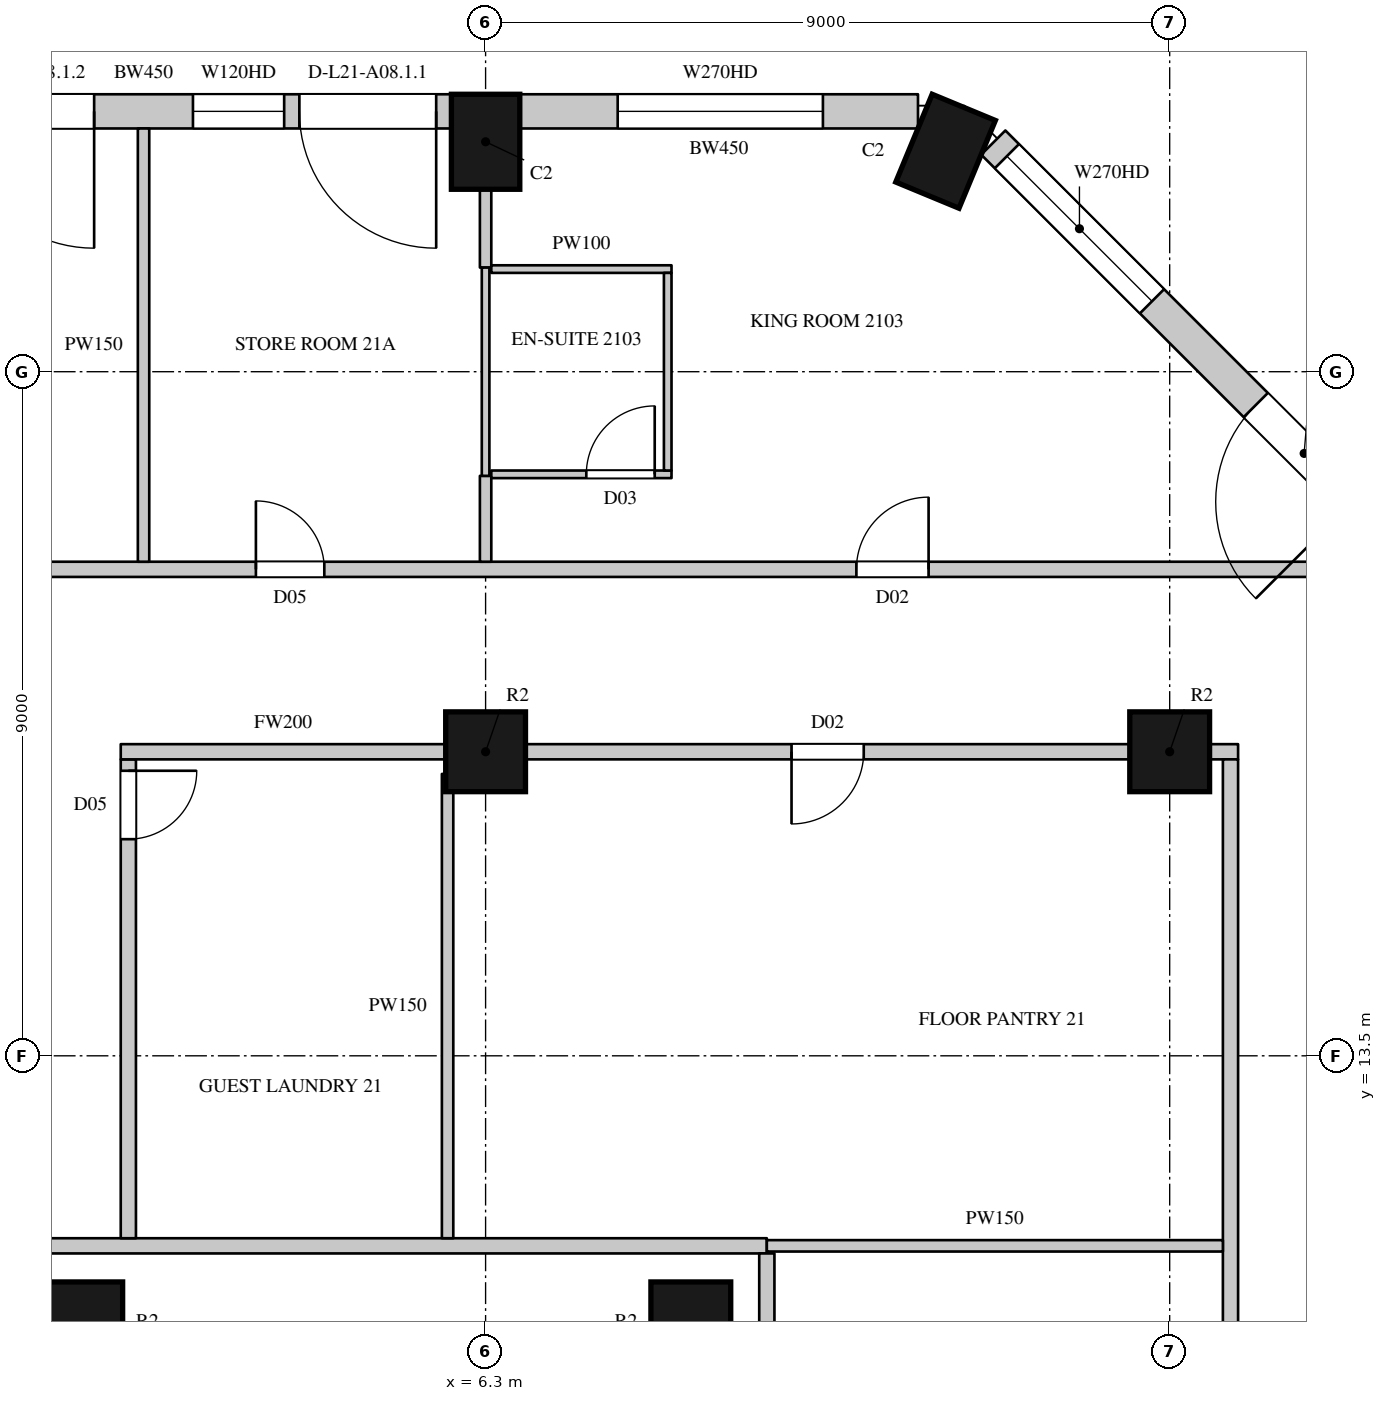
"""IFC4 building model, lengths in metres.
Left out: names, types, materials, properties, quantities, classifications, styles, units other than length and angle.
Written with IfcOpenShell. Run it as: python <this file> out.ifc"""

import sys

from ifc_helpers import new_model, si_unit, direction, frame, frame_2d, origin, origin_2d, place, context, subcontext, project, spatial, rectangle, circle, extrude, element, fill, save


model = new_model("IFC4")
c1 = context("Model", 3, precision=1e-05, world=origin(), true_north=direction((0.0, 1.0)))
c2 = subcontext(c1, "Body", "Model", "MODEL_VIEW")
j1 = project(units=[si_unit("LENGTHUNIT", "METRE"), si_unit("PLANEANGLEUNIT", "RADIAN")], contexts=[c1])
p1 = place(None, origin())
s1 = spatial("IfcSite", under=j1, at=p1, CompositionType="ELEMENT")
p2 = place(p1, origin())
s2 = spatial("IfcBuilding", under=s1, at=p2, CompositionType="ELEMENT")
p3 = place(p2, frame((0.0, 0.0, 105.9)))
s3 = spatial("IfcBuildingStorey", under=s2, at=p3, CompositionType="ELEMENT", Elevation=105.9)
for number, where, z_axis, x_axis in (
    (1, (12.352, 25.4, 0.0), (0.0, 0.0, 1.0), (-0.924, 0.383, 0.0)),
    (2, (6.3, 25.525, 0.0), (0.0, 0.0, 1.0), (-1.0, 0.0, 0.0)),
):
    element("IfcColumn", number, at=place(p3, frame(where, z_axis=z_axis, x_axis=x_axis)), inside=s3, PredefinedType="COLUMN", context=c2, shape_type="SweptSolid", body=[
        extrude(rectangle(XDim=0.9, YDim=1.25, at=origin_2d()), origin(), (0.0, 0.0, 1.0), 3.6),
    ])
for number, where, z_axis, x_axis in (
    (3, (6.3, 17.5, 0.0), (0.0, 0.0, 1.0), (1.0, 0.0, 0.0)),
    (4, (15.3, 17.5, 0.0), (0.0, 0.0, 1.0), (1.0, 0.0, 0.0)),
    (5, (1.0, 10.0, 0.0), (0.0, 0.0, 1.0), (1.0, 0.0, 0.0)),
    (6, (9.0, 10.0, 0.0), (0.0, 0.0, 1.0), (1.0, 0.0, 0.0)),
):
    element("IfcColumn", number, at=place(p3, frame(where, z_axis=z_axis, x_axis=x_axis)), inside=s3, PredefinedType="COLUMN", context=c2, shape_type="SweptSolid", body=[
        extrude(circle(Radius=0.525, at=origin_2d()), origin(), (0.0, 0.0, 1.0), 3.6),
    ])
p4 = place(p3, frame((18.229, 20.265, 0.0), z_axis=(0.0, 0.0, 1.0), x_axis=(-0.707106781187, 0.707106781187, 0.0)))
e7 = element("IfcWall", 7, at=p4, inside=s3, PredefinedType="SOLIDWALL", context=c2, shape_type="SweptSolid", body=[
    extrude(rectangle(XDim=7.424, YDim=0.45, at=frame_2d((3.712, 0.0))), origin(), (0.0, 0.0, 1.0), 3.3),
])
p5 = place(p4, frame((0.74, 0.0, 0.0)))
e8 = element("IfcOpeningElement", 8, at=p5, cuts=e7, PredefinedType="OPENING", context=c2, shape_type="SweptSolid", body=[
    extrude(rectangle(XDim=1.8, YDim=2.4, at=frame_2d((0.9, 1.2))), frame((0.0, 0.235, 0.0), z_axis=(0.0, -1.0, 0.0), x_axis=(1.0, 0.0, 0.0)), (0.0, 0.0, 1.0), 0.47),
])
p6 = place(p4, frame((4.471, 0.0, 1.05)))
e9 = element("IfcOpeningElement", 9, at=p6, cuts=e7, PredefinedType="OPENING", context=c2, shape_type="SweptSolid", body=[
    extrude(rectangle(XDim=2.7, YDim=2.0, at=frame_2d((1.35, 1.0))), frame((0.0, 0.235, 0.0), z_axis=(0.0, -1.0, 0.0), x_axis=(1.0, 0.0, 0.0)), (0.0, 0.0, 1.0), 0.47),
])
p7 = place(p3, frame((11.989, 25.925, 0.0), z_axis=(0.0, 0.0, 1.0), x_axis=(-1.0, 0.0, 0.0)))
e10 = element("IfcWall", 10, at=p7, inside=s3, PredefinedType="SOLIDWALL", context=c2, shape_type="SweptSolid", body=[
    extrude(rectangle(XDim=5.239, YDim=0.45, at=frame_2d((2.619, 0.0))), origin(), (0.0, 0.0, 1.0), 3.3),
])
p8 = place(p7, frame((1.251, 0.0, 1.05)))
e11 = element("IfcOpeningElement", 11, at=p8, cuts=e10, PredefinedType="OPENING", context=c2, shape_type="SweptSolid", body=[
    extrude(rectangle(XDim=2.7, YDim=2.0, at=frame_2d((1.35, 1.0))), frame((0.0, 0.235, 0.0), z_axis=(0.0, -1.0, 0.0), x_axis=(1.0, 0.0, 0.0)), (0.0, 0.0, 1.0), 0.47),
])
p9 = place(p3, frame((5.85, 25.925, 0.0), z_axis=(0.0, 0.0, 1.0), x_axis=(-1.0, 0.0, 0.0)))
e12 = element("IfcWall", 12, at=p9, inside=s3, PredefinedType="SOLIDWALL", context=c2, shape_type="SweptSolid", body=[
    extrude(rectangle(XDim=8.1, YDim=0.45, at=frame_2d((4.05, 0.0))), origin(), (0.0, 0.0, 1.0), 3.3),
])
p10 = place(p9, frame((0.2, 0.0, 0.0)))
e13 = element("IfcOpeningElement", 13, at=p10, cuts=e12, PredefinedType="OPENING", context=c2, shape_type="SweptSolid", body=[
    extrude(rectangle(XDim=1.8, YDim=2.4, at=frame_2d((0.9, 1.2))), frame((0.0, 0.235, 0.0), z_axis=(0.0, -1.0, 0.0), x_axis=(1.0, 0.0, 0.0)), (0.0, 0.0, 1.0), 0.47),
])
p11 = place(p9, frame((2.2, 0.0, 1.05)))
e14 = element("IfcOpeningElement", 14, at=p11, cuts=e12, PredefinedType="OPENING", context=c2, shape_type="SweptSolid", body=[
    extrude(rectangle(XDim=1.2, YDim=2.0, at=frame_2d((0.6, 1.0))), frame((0.0, 0.235, 0.0), z_axis=(0.0, -1.0, 0.0), x_axis=(1.0, 0.0, 0.0)), (0.0, 0.0, 1.0), 0.47),
])
p12 = place(p9, frame((4.7, 0.0, 0.0)))
e15 = element("IfcOpeningElement", 15, at=p12, cuts=e12, PredefinedType="OPENING", context=c2, shape_type="SweptSolid", body=[
    extrude(rectangle(XDim=1.8, YDim=2.4, at=frame_2d((0.9, 1.2))), frame((0.0, 0.235, 0.0), z_axis=(0.0, -1.0, 0.0), x_axis=(1.0, 0.0, 0.0)), (0.0, 0.0, 1.0), 0.47),
])
p13 = place(p9, frame((6.7, 0.0, 1.05)))
e16 = element("IfcOpeningElement", 16, at=p13, cuts=e12, PredefinedType="OPENING", context=c2, shape_type="SweptSolid", body=[
    extrude(rectangle(XDim=1.2, YDim=2.0, at=frame_2d((0.6, 1.0))), frame((0.0, 0.235, 0.0), z_axis=(0.0, -1.0, 0.0), x_axis=(1.0, 0.0, 0.0)), (0.0, 0.0, 1.0), 0.47),
])
p14 = place(p3, frame((16.486, 23.529, 0.0), z_axis=(0.0, 0.0, 1.0), x_axis=(-0.707022305137, 0.707191247145, 0.0)))
e17 = element("IfcWall", 17, at=p14, inside=s3, PredefinedType="SOLIDWALL", context=c2, shape_type="SweptSolid", body=[
    extrude(rectangle(XDim=1.445, YDim=0.45, at=frame_2d((0.723, 0.0))), origin(), (0.0, 0.0, 1.0), 0.6),
])
p15 = place(p3, frame((-23.822, 19.9, 0.0), z_axis=(0.0, 0.0, 1.0), x_axis=(1.0, 0.0, 0.0)))
e18 = element("IfcWall", 18, at=p15, inside=s3, PredefinedType="PARTITIONING", context=c2, shape_type="SweptSolid", body=[
    extrude(rectangle(XDim=41.605, YDim=0.2, at=frame_2d((20.803, 0.0))), origin(), (0.0, 0.0, 1.0), 3.3),
])
p16 = place(p15, frame((14.25, 0.0, 0.0)))
e19 = element("IfcOpeningElement", 19, at=p16, cuts=e18, PredefinedType="OPENING", context=c2, shape_type="SweptSolid", body=[
    extrude(rectangle(XDim=0.9, YDim=2.2, at=frame_2d((0.45, 1.1))), frame((0.0, 0.11, 0.0), z_axis=(0.0, -1.0, 0.0), x_axis=(1.0, 0.0, 0.0)), (0.0, 0.0, 1.0), 0.22),
])
p17 = place(p15, frame((27.1, 0.0, 0.0)))
e20 = element("IfcOpeningElement", 20, at=p17, cuts=e18, PredefinedType="OPENING", context=c2, shape_type="SweptSolid", body=[
    extrude(rectangle(XDim=0.9, YDim=2.2, at=frame_2d((0.45, 1.1))), frame((0.0, 0.11, 0.0), z_axis=(0.0, -1.0, 0.0), x_axis=(1.0, 0.0, 0.0)), (0.0, 0.0, 1.0), 0.22),
])
p18 = place(p15, frame((0.8, 0.0, 0.0)))
e21 = element("IfcOpeningElement", 21, at=p18, cuts=e18, PredefinedType="OPENING", context=c2, shape_type="SweptSolid", body=[
    extrude(rectangle(XDim=1.1, YDim=2.4, at=frame_2d((0.55, 1.2))), frame((0.0, 0.11, 0.0), z_axis=(0.0, -1.0, 0.0), x_axis=(1.0, 0.0, 0.0)), (0.0, 0.0, 1.0), 0.22),
])
p19 = place(p15, frame((23.2, 0.0, 0.0)))
e22 = element("IfcOpeningElement", 22, at=p19, cuts=e18, PredefinedType="OPENING", context=c2, shape_type="SweptSolid", body=[
    extrude(rectangle(XDim=0.95, YDim=2.2, at=frame_2d((0.475, 1.1))), frame((0.0, 0.11, 0.0), z_axis=(0.0, -1.0, 0.0), x_axis=(1.0, 0.0, 0.0)), (0.0, 0.0, 1.0), 0.22),
])
p20 = place(p15, frame((35.0, 0.0, 0.0)))
e23 = element("IfcOpeningElement", 23, at=p20, cuts=e18, PredefinedType="OPENING", context=c2, shape_type="SweptSolid", body=[
    extrude(rectangle(XDim=0.95, YDim=2.2, at=frame_2d((0.475, 1.1))), frame((0.0, 0.11, 0.0), z_axis=(0.0, -1.0, 0.0), x_axis=(1.0, 0.0, 0.0)), (0.0, 0.0, 1.0), 0.22),
])
p21 = place(p3, frame((-7.9, 11.0, 0.0), z_axis=(0.0, 0.0, 1.0), x_axis=(1.0, 0.0, 0.0)))
e24 = element("IfcWall", 24, at=p21, inside=s3, PredefinedType="PARTITIONING", context=c2, shape_type="SweptSolid", body=[
    extrude(rectangle(XDim=17.9, YDim=0.2, at=frame_2d((8.95, 0.0))), origin(), (0.0, 0.0, 1.0), 3.3),
])
p22 = place(p21, frame((6.5, 0.0, 0.0)))
e25 = element("IfcOpeningElement", 25, at=p22, cuts=e24, PredefinedType="OPENING", context=c2, shape_type="SweptSolid", body=[
    extrude(rectangle(XDim=1.5, YDim=2.2, at=frame_2d((0.75, 1.1))), frame((0.0, 0.11, 0.0), z_axis=(0.0, -1.0, 0.0), x_axis=(1.0, 0.0, 0.0)), (0.0, 0.0, 1.0), 0.22),
])
p23 = place(p3, frame((1.6, 11.1, 0.0), z_axis=(0.0, 0.0, 1.0), x_axis=(0.0, 1.0, 0.0)))
e26 = element("IfcWall", 26, at=p23, inside=s3, PredefinedType="PARTITIONING", context=c2, shape_type="SweptSolid", body=[
    extrude(rectangle(XDim=6.3, YDim=0.2, at=frame_2d((3.15, 0.0))), origin(), (0.0, 0.0, 1.0), 3.3),
])
p24 = place(p23, frame((5.25, 0.0, 0.0)))
e27 = element("IfcOpeningElement", 27, at=p24, cuts=e26, PredefinedType="OPENING", context=c2, shape_type="SweptSolid", body=[
    extrude(rectangle(XDim=0.9, YDim=2.2, at=frame_2d((0.45, 1.1))), frame((0.0, 0.11, 0.0), z_axis=(0.0, -1.0, 0.0), x_axis=(1.0, 0.0, 0.0)), (0.0, 0.0, 1.0), 0.22),
])
p25 = place(p3, frame((1.5, 17.5, 0.0), z_axis=(0.0, 0.0, 1.0), x_axis=(1.0, 0.0, 0.0)))
e28 = element("IfcWall", 28, at=p25, inside=s3, PredefinedType="PARTITIONING", context=c2, shape_type="SweptSolid", body=[
    extrude(rectangle(XDim=4.275, YDim=0.2, at=frame_2d((2.137, 0.0))), origin(), (0.0, 0.0, 1.0), 2.75),
])
p26 = place(p3, frame((6.825, 17.5, 0.0), z_axis=(0.0, 0.0, 1.0), x_axis=(1.0, 0.0, 0.0)))
e29 = element("IfcWall", 29, at=p26, inside=s3, PredefinedType="PARTITIONING", context=c2, shape_type="SweptSolid", body=[
    extrude(rectangle(XDim=7.95, YDim=0.2, at=frame_2d((3.975, 0.0))), origin(), (0.0, 0.0, 1.0), 2.75),
])
p27 = place(p26, frame((3.5, 0.0, 0.0)))
e30 = element("IfcOpeningElement", 30, at=p27, cuts=e29, PredefinedType="OPENING", context=c2, shape_type="SweptSolid", body=[
    extrude(rectangle(XDim=0.95, YDim=2.2, at=frame_2d((0.475, 1.1))), frame((0.0, 0.11, 0.0), z_axis=(0.0, -1.0, 0.0), x_axis=(1.0, 0.0, 0.0)), (0.0, 0.0, 1.0), 0.22),
])
p28 = place(p3, frame((15.825, 17.5, 0.0), z_axis=(0.0, 0.0, 1.0), x_axis=(1.0, 0.0, 0.0)))
e31 = element("IfcWall", 31, at=p28, inside=s3, PredefinedType="PARTITIONING", context=c2, shape_type="SweptSolid", body=[
    extrude(rectangle(XDim=0.375, YDim=0.2, at=frame_2d((0.188, 0.0))), origin(), (0.0, 0.0, 1.0), 3.3),
])
p29 = place(p3, frame((10.0, -10.9, 0.0), z_axis=(0.0, 0.0, 1.0), x_axis=(0.0, 1.0, 0.0)))
e32 = element("IfcWall", 32, at=p29, inside=s3, PredefinedType="PARTITIONING", context=c2, shape_type="SweptSolid", body=[
    extrude(rectangle(XDim=21.8, YDim=0.2, at=frame_2d((10.9, 0.0))), origin(), (0.0, 0.0, 1.0), 3.3),
])
p30 = place(p29, frame((15.9, 0.0, 0.0)))
e33 = element("IfcOpeningElement", 33, at=p30, cuts=e32, PredefinedType="OPENING", context=c2, shape_type="SweptSolid", body=[
    extrude(rectangle(XDim=1.5, YDim=2.2, at=frame_2d((0.75, 1.1))), frame((0.0, 0.11, 0.0), z_axis=(0.0, -1.0, 0.0), x_axis=(1.0, 0.0, 0.0)), (0.0, 0.0, 1.0), 0.22),
])
p31 = place(p29, frame((11.55, 0.0, 0.0)))
e34 = element("IfcOpeningElement", 34, at=p31, cuts=e32, PredefinedType="OPENING", context=c2, shape_type="SweptSolid", body=[
    extrude(rectangle(XDim=1.5, YDim=2.2, at=frame_2d((0.75, 1.1))), frame((0.0, 0.11, 0.0), z_axis=(0.0, -1.0, 0.0), x_axis=(1.0, 0.0, 0.0)), (0.0, 0.0, 1.0), 0.22),
])
p32 = place(p3, frame((16.1, 6.825, 0.0), z_axis=(0.0, 0.0, 1.0), x_axis=(0.0, 1.0, 0.0)))
e35 = element("IfcWall", 35, at=p32, inside=s3, PredefinedType="PARTITIONING", context=c2, shape_type="SweptSolid", body=[
    extrude(rectangle(XDim=10.575, YDim=0.2, at=frame_2d((5.288, 0.0))), origin(), (0.0, 0.0, 1.0), 3.3),
])
p33 = place(p3, frame((1.8, 20.0, 0.0), z_axis=(0.0, 0.0, 1.0), x_axis=(0.0, 1.0, 0.0)))
e36 = element("IfcWall", 36, at=p33, inside=s3, PredefinedType="PARTITIONING", context=c2, shape_type="SweptSolid", body=[
    extrude(rectangle(XDim=5.7, YDim=0.15, at=frame_2d((2.85, 0.0))), origin(), (0.0, 0.0, 1.0), 2.65),
])
p34 = place(p3, frame((5.8, 11.1, 0.0), z_axis=(0.0, 0.0, 1.0), x_axis=(0.0, 1.0, 0.0)))
e37 = element("IfcWall", 37, at=p34, inside=s3, PredefinedType="PARTITIONING", context=c2, shape_type="SweptSolid", body=[
    extrude(rectangle(XDim=6.108, YDim=0.15, at=frame_2d((3.054, 0.0))), origin(), (0.0, 0.0, 1.0), 3.3),
])
p35 = place(p3, frame((6.3, 20.0, 0.0), z_axis=(0.0, 0.0, 1.0), x_axis=(0.0, 1.0, 0.0)))
e38 = element("IfcWall", 38, at=p35, inside=s3, PredefinedType="PARTITIONING", context=c2, shape_type="SweptSolid", body=[
    extrude(rectangle(XDim=1.13, YDim=0.15, at=frame_2d((0.565, 0.0))), origin(), (0.0, 0.0, 1.0), 2.75),
])
p36 = place(p3, frame((6.3, 23.87, 0.0), z_axis=(0.0, 0.0, 1.0), x_axis=(0.0, 1.0, 0.0)))
e39 = element("IfcWall", 39, at=p36, inside=s3, PredefinedType="PARTITIONING", context=c2, shape_type="SweptSolid", body=[
    extrude(rectangle(XDim=1.03, YDim=0.15, at=frame_2d((0.515, 0.0))), origin(), (0.0, 0.0, 1.0), 2.75),
])
p37 = place(p3, frame((10.0, 11.0, 0.0), z_axis=(0.0, 0.0, 1.0), x_axis=(1.0, 0.0, 0.0)))
e40 = element("IfcWall", 40, at=p37, inside=s3, PredefinedType="PARTITIONING", context=c2, shape_type="SweptSolid", body=[
    extrude(rectangle(XDim=6.0, YDim=0.15, at=frame_2d((3.0, 0.0))), origin(), (0.0, 0.0, 1.0), 3.3),
])
p38 = place(p3, frame((6.3, 21.13, 0.0), z_axis=(0.0, 0.0, 1.0), x_axis=(0.0, 1.0, 0.0)))
e41 = element("IfcWall", 41, at=p38, inside=s3, PredefinedType="PARTITIONING", context=c2, shape_type="SweptSolid", body=[
    extrude(rectangle(XDim=2.74, YDim=0.1, at=frame_2d((1.37, 0.0))), origin(), (0.0, 0.0, 1.0), 2.75),
])
p39 = place(p3, frame((6.375, 21.15, 0.0), z_axis=(0.0, 0.0, 1.0), x_axis=(1.0, 0.0, 0.0)))
e42 = element("IfcWall", 42, at=p39, inside=s3, PredefinedType="PARTITIONING", context=c2, shape_type="SweptSolid", body=[
    extrude(rectangle(XDim=2.371, YDim=0.1, at=frame_2d((1.186, 0.0))), origin(), (0.0, 0.0, 1.0), 3.3),
])
p40 = place(p39, frame((1.25, 0.0, 0.0)))
e43 = element("IfcOpeningElement", 43, at=p40, cuts=e42, PredefinedType="OPENING", context=c2, shape_type="SweptSolid", body=[
    extrude(rectangle(XDim=0.9, YDim=2.2, at=frame_2d((0.45, 1.1))), frame((0.0, 0.06, 0.0), z_axis=(0.0, -1.0, 0.0), x_axis=(1.0, 0.0, 0.0)), (0.0, 0.0, 1.0), 0.12),
])
p41 = place(p3, frame((6.375, 23.85, 0.0), z_axis=(0.0, 0.0, 1.0), x_axis=(1.0, 0.0, 0.0)))
e44 = element("IfcWall", 44, at=p41, inside=s3, PredefinedType="PARTITIONING", context=c2, shape_type="SweptSolid", body=[
    extrude(rectangle(XDim=2.371, YDim=0.1, at=frame_2d((1.186, 0.0))), origin(), (0.0, 0.0, 1.0), 3.3),
])
p42 = place(p3, frame((8.696, 21.2, 0.0), z_axis=(0.0, 0.0, 1.0), x_axis=(0.0, 1.0, 0.0)))
e45 = element("IfcWall", 45, at=p42, inside=s3, PredefinedType="PARTITIONING", context=c2, shape_type="SweptSolid", body=[
    extrude(rectangle(XDim=2.6, YDim=0.1, at=frame_2d((1.3, 0.0))), origin(), (0.0, 0.0, 1.0), 3.3),
])
p43 = place(p5, origin())
e46 = element("IfcDoor", 46, at=p43, inside=s3, OperationType="SLIDING_TO_LEFT", PredefinedType="DOOR", context=c2, shape_type="SweptSolid", body=[
    extrude(rectangle(XDim=1.8, YDim=2.4, at=frame_2d((0.9, 1.2))), frame((0.0, 0.13, 0.0), z_axis=(0.0, -1.0, 0.0), x_axis=(1.0, 0.0, 0.0)), (0.0, 0.0, 1.0), 0.05),
])
fill(e8, e46)
p44 = place(p6, origin())
e47 = element("IfcWindow", 47, at=p44, inside=s3, PartitioningType="SINGLE_PANEL", PredefinedType="WINDOW", context=c2, shape_type="SweptSolid", body=[
    extrude(rectangle(XDim=2.7, YDim=2.0, at=frame_2d((1.35, 1.0))), frame((0.0, 0.135, 0.0), z_axis=(0.0, -1.0, 0.0), x_axis=(1.0, 0.0, 0.0)), (0.0, 0.0, 1.0), 0.06),
])
fill(e9, e47)
p45 = place(p8, origin())
e48 = element("IfcWindow", 48, at=p45, inside=s3, PartitioningType="SINGLE_PANEL", PredefinedType="WINDOW", context=c2, shape_type="SweptSolid", body=[
    extrude(rectangle(XDim=2.7, YDim=2.0, at=frame_2d((1.35, 1.0))), frame((0.0, 0.135, 0.0), z_axis=(0.0, -1.0, 0.0), x_axis=(1.0, 0.0, 0.0)), (0.0, 0.0, 1.0), 0.06),
])
fill(e11, e48)
p46 = place(p10, origin())
e49 = element("IfcDoor", 49, at=p46, inside=s3, OperationType="SLIDING_TO_LEFT", PredefinedType="DOOR", context=c2, shape_type="SweptSolid", body=[
    extrude(rectangle(XDim=1.8, YDim=2.4, at=frame_2d((0.9, 1.2))), frame((0.0, 0.13, 0.0), z_axis=(0.0, -1.0, 0.0), x_axis=(1.0, 0.0, 0.0)), (0.0, 0.0, 1.0), 0.05),
])
fill(e13, e49)
p47 = place(p11, origin())
e50 = element("IfcWindow", 50, at=p47, inside=s3, PartitioningType="SINGLE_PANEL", PredefinedType="WINDOW", context=c2, shape_type="SweptSolid", body=[
    extrude(rectangle(XDim=1.2, YDim=2.0, at=frame_2d((0.6, 1.0))), frame((0.0, 0.135, 0.0), z_axis=(0.0, -1.0, 0.0), x_axis=(1.0, 0.0, 0.0)), (0.0, 0.0, 1.0), 0.06),
])
fill(e14, e50)
p48 = place(p12, origin())
e51 = element("IfcDoor", 51, at=p48, inside=s3, OperationType="SLIDING_TO_LEFT", PredefinedType="DOOR", context=c2, shape_type="SweptSolid", body=[
    extrude(rectangle(XDim=1.8, YDim=2.4, at=frame_2d((0.9, 1.2))), frame((0.0, 0.13, 0.0), z_axis=(0.0, -1.0, 0.0), x_axis=(1.0, 0.0, 0.0)), (0.0, 0.0, 1.0), 0.05),
])
fill(e15, e51)
p49 = place(p24, origin())
e52 = element("IfcDoor", 52, at=p49, inside=s3, OperationType="SINGLE_SWING_LEFT", PredefinedType="DOOR", context=c2, shape_type="SweptSolid", body=[
    extrude(rectangle(XDim=0.9, YDim=2.2, at=frame_2d((0.45, 1.1))), frame((0.0, 0.025, 0.0), z_axis=(0.0, -1.0, 0.0), x_axis=(1.0, 0.0, 0.0)), (0.0, 0.0, 1.0), 0.05),
])
fill(e27, e52)
p50 = place(p27, origin())
e53 = element("IfcDoor", 53, at=p50, inside=s3, OperationType="SINGLE_SWING_RIGHT", PredefinedType="DOOR", context=c2, shape_type="SweptSolid", body=[
    extrude(rectangle(XDim=0.95, YDim=2.2, at=frame_2d((0.475, 1.1))), frame((0.0, 0.025, 0.0), z_axis=(0.0, -1.0, 0.0), x_axis=(1.0, 0.0, 0.0)), (0.0, 0.0, 1.0), 0.05),
])
fill(e30, e53)
p51 = place(p17, origin())
e54 = element("IfcDoor", 54, at=p51, inside=s3, OperationType="SINGLE_SWING_LEFT", PredefinedType="DOOR", context=c2, shape_type="SweptSolid", body=[
    extrude(rectangle(XDim=0.9, YDim=2.2, at=frame_2d((0.45, 1.1))), frame((0.0, 0.025, 0.0), z_axis=(0.0, -1.0, 0.0), x_axis=(1.0, 0.0, 0.0)), (0.0, 0.0, 1.0), 0.05),
])
fill(e20, e54)
p52 = place(p20, origin())
e55 = element("IfcDoor", 55, at=p52, inside=s3, OperationType="SINGLE_SWING_RIGHT", PredefinedType="DOOR", context=c2, shape_type="SweptSolid", body=[
    extrude(rectangle(XDim=0.95, YDim=2.2, at=frame_2d((0.475, 1.1))), frame((0.0, 0.025, 0.0), z_axis=(0.0, -1.0, 0.0), x_axis=(1.0, 0.0, 0.0)), (0.0, 0.0, 1.0), 0.05),
])
fill(e23, e55)
p53 = place(p40, origin())
e56 = element("IfcDoor", 56, at=p53, inside=s3, OperationType="SINGLE_SWING_RIGHT", PredefinedType="DOOR", context=c2, shape_type="SweptSolid", body=[
    extrude(rectangle(XDim=0.9, YDim=2.2, at=frame_2d((0.45, 1.1))), frame((0.0, 0.025, 0.0), z_axis=(0.0, -1.0, 0.0), x_axis=(1.0, 0.0, 0.0)), (0.0, 0.0, 1.0), 0.05),
])
fill(e43, e56)
save(model, sys.argv[1])
